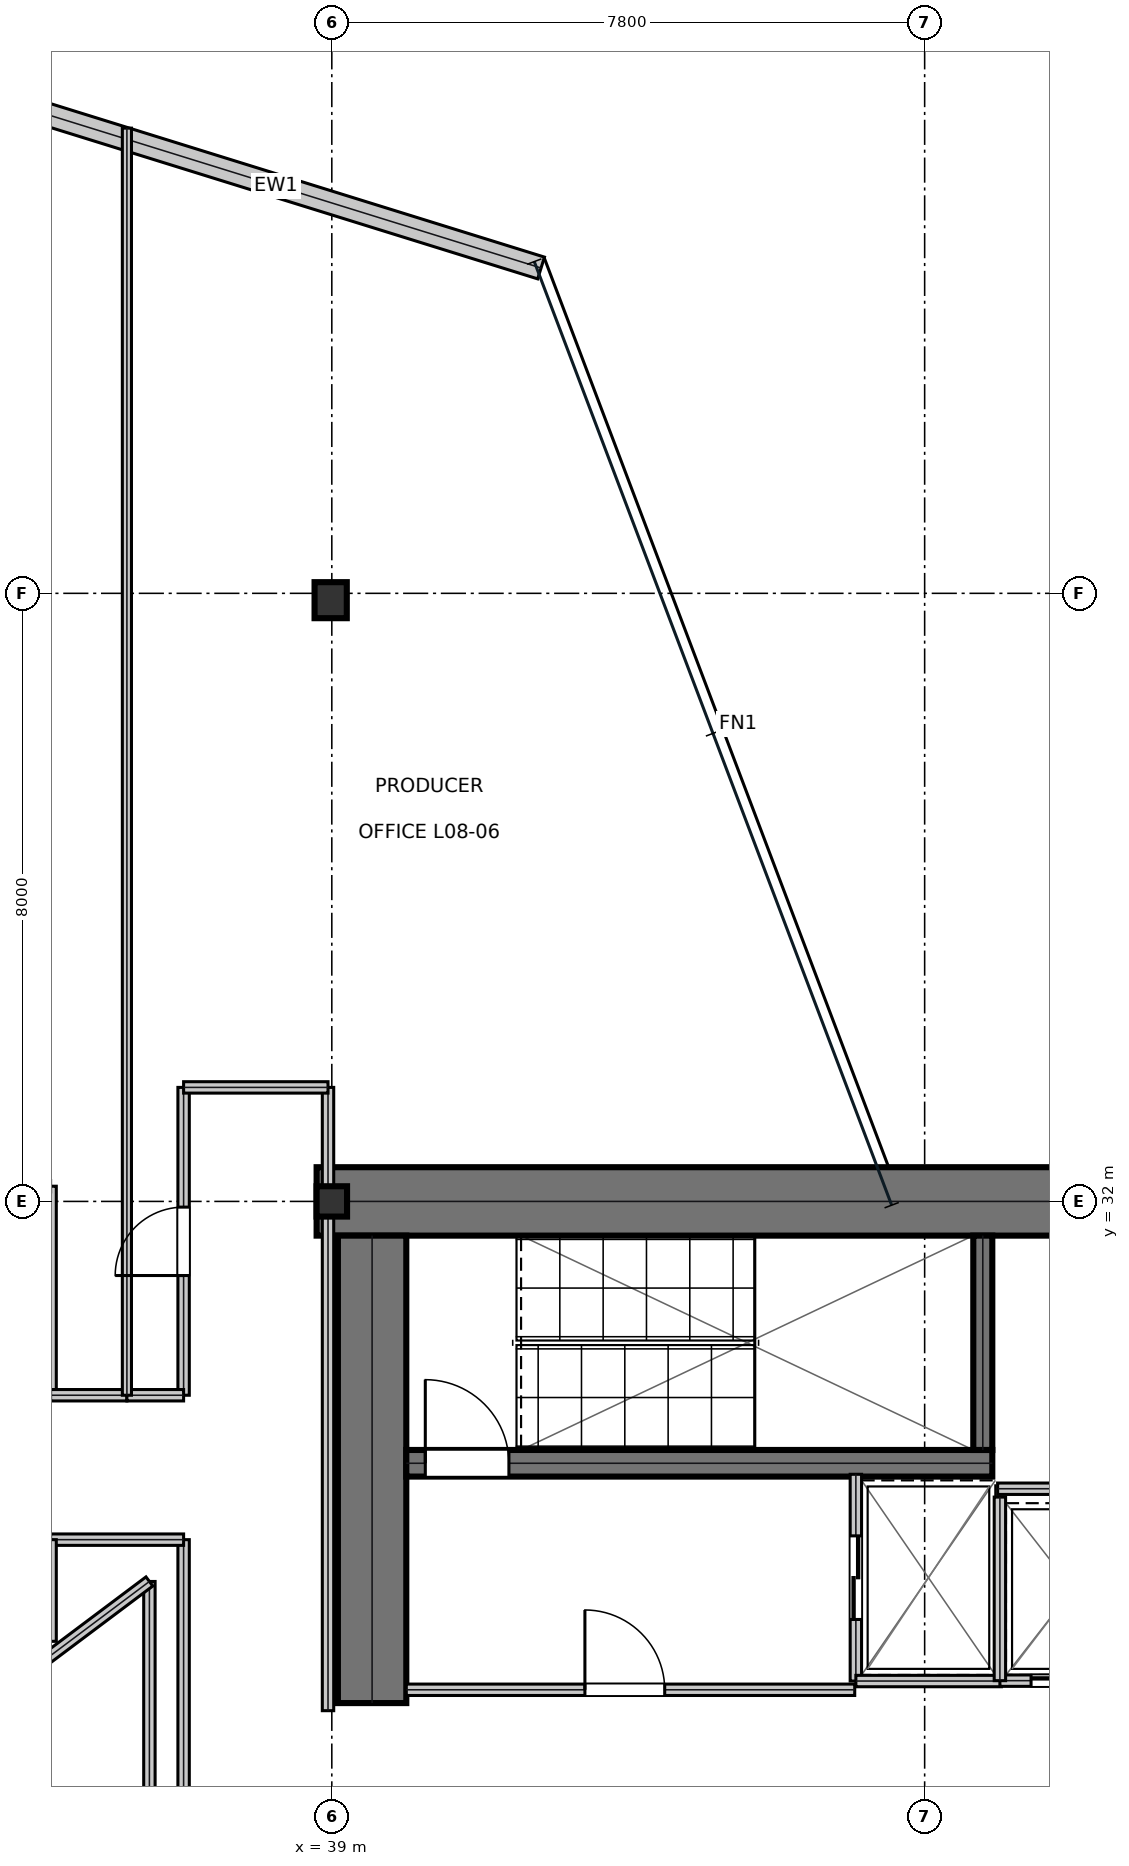
"""IFC4 building model, lengths in metres.
Left out: names, types, materials, properties, quantities, classifications, styles, units other than length and angle.
Written with IfcOpenShell. Run it as: python <this file> out.ifc"""

import sys

from ifc_helpers import new_model, si_unit, direction, frame, frame_2d, origin, origin_2d, place, context, subcontext, project, spatial, rectangle, i_section, extrude, element, fill, save


model = new_model("IFC4")
c1 = context("Model", 3, precision=1e-05, world=origin(), true_north=direction((0.0, 1.0)))
c2 = subcontext(c1, "Body", "Model", "MODEL_VIEW")
j1 = project(units=[si_unit("LENGTHUNIT", "METRE"), si_unit("PLANEANGLEUNIT", "RADIAN")], contexts=[c1])
p1 = place(None, origin())
s1 = spatial("IfcSite", under=j1, at=p1, CompositionType="ELEMENT")
p2 = place(p1, origin())
s2 = spatial("IfcBuilding", under=s1, at=p2, CompositionType="ELEMENT")
p3 = place(p2, frame((0.0, 0.0, 41.85)))
s3 = spatial("IfcBuildingStorey", under=s2, at=p3, CompositionType="ELEMENT", Elevation=41.85)
p4 = place(p3, frame((38.8, 32.0, 0.0), z_axis=(0.0, 0.0, 1.0), x_axis=(1.0, 0.0, 0.0)))
e1 = element("IfcWall", 1, at=p4, inside=s3, PredefinedType="SHEAR", context=c2, shape_type="SweptSolid", body=[
    extrude(rectangle(XDim=16.0, YDim=0.9, at=frame_2d((8.0, 0.0))), origin(), (0.0, 0.0, 1.0), 3.81),
])
p5 = place(p3, frame((39.53, 25.4, 0.0), z_axis=(0.0, 0.0, 1.0), x_axis=(0.0, 1.0, 0.0)))
e2 = element("IfcWall", 2, at=p5, inside=s3, PredefinedType="SHEAR", context=c2, shape_type="SweptSolid", body=[
    extrude(rectangle(XDim=6.15, YDim=0.9, at=frame_2d((3.075, 0.0))), origin(), (0.0, 0.0, 1.0), 3.81),
])
p6 = place(p3, frame((39.98, 28.555, 0.0), z_axis=(0.0, 0.0, 1.0), x_axis=(1.0, 0.0, 0.0)))
e3 = element("IfcWall", 3, at=p6, inside=s3, PredefinedType="SHEAR", context=c2, shape_type="SweptSolid", body=[
    extrude(rectangle(XDim=7.71, YDim=0.35, at=frame_2d((3.855, 0.0))), origin(), (0.0, 0.0, 1.0), 3.81),
])
p7 = place(p6, frame((0.25, 0.0, 0.0)))
e4 = element("IfcOpeningElement", 4, at=p7, cuts=e3, PredefinedType="OPENING", context=c2, shape_type="SweptSolid", body=[
    extrude(rectangle(XDim=1.1, YDim=2.15, at=frame_2d((0.55, 1.075))), frame((0.0, 0.185, 0.0), z_axis=(0.0, -1.0, 0.0), x_axis=(1.0, 0.0, 0.0)), (0.0, 0.0, 1.0), 0.37),
])
p8 = place(p3, frame((47.565, 28.73, 0.0), z_axis=(0.0, 0.0, 1.0), x_axis=(0.0, 1.0, 0.0)))
e5 = element("IfcWall", 5, at=p8, inside=s3, PredefinedType="SHEAR", context=c2, shape_type="SweptSolid", body=[
    extrude(rectangle(XDim=2.82, YDim=0.25, at=frame_2d((1.41, 0.0))), origin(), (0.0, 0.0, 1.0), 3.81),
])
p9 = place(p3, frame((39.0, 32.0, 0.0), z_axis=(0.0, 0.0, 1.0), x_axis=(1.0, 0.0, 0.0)))
e6 = element("IfcColumn", 6, at=p9, inside=s3, PredefinedType="COLUMN", context=c2, shape_type="SweptSolid", body=[
    extrude(i_section(OverallWidth=0.401, OverallDepth=0.399, WebThickness=0.025, FlangeThickness=0.04, at=origin_2d()), origin(), (0.0, 0.0, 1.0), 4.044),
])
p10 = place(p3, frame((38.985, 39.91, 0.016), z_axis=(0.0, 0.0, 1.0), x_axis=(1.0, 0.0, 0.0)))
e7 = element("IfcColumn", 7, at=p10, inside=s3, PredefinedType="COLUMN", context=c2, shape_type="SweptSolid", body=[
    extrude(i_section(OverallWidth=0.424, OverallDepth=0.474, WebThickness=0.048, FlangeThickness=0.077, at=origin_2d()), origin(), (0.0, 0.0, 1.0), 4.018),
])
p11 = place(p3, frame((41.753, 44.28, 0.0), z_axis=(0.0, 0.0, 1.0), x_axis=(-0.954957033511, 0.296744105498, 0.0)))
e8 = element("IfcWall", 8, at=p11, inside=s3, PredefinedType="STANDARD", context=c2, shape_type="SweptSolid", body=[
    extrude(rectangle(XDim=7.302, YDim=0.3, at=frame_2d((3.651, 0.0))), origin(), (0.0, 0.0, 1.0), 3.81),
])
p12 = place(p3, frame((39.98, 25.575, 0.0), z_axis=(0.0, 0.0, 1.0), x_axis=(1.0, 0.0, 0.0)))
e9 = element("IfcWall", 9, at=p12, inside=s3, PredefinedType="PARTITIONING", context=c2, shape_type="SweptSolid", body=[
    extrude(rectangle(XDim=5.9, YDim=0.15, at=frame_2d((2.95, 0.0))), origin(), (0.0, 0.0, 1.0), 3.81),
])
p13 = place(p12, frame((2.35, 0.0, 0.0)))
e10 = element("IfcOpeningElement", 10, at=p13, cuts=e9, PredefinedType="OPENING", context=c2, shape_type="SweptSolid", body=[
    extrude(rectangle(XDim=1.05, YDim=2.15, at=frame_2d((0.525, 1.075))), frame((0.0, 0.085, 0.0), z_axis=(0.0, -1.0, 0.0), x_axis=(1.0, 0.0, 0.0)), (0.0, 0.0, 1.0), 0.17),
])
p14 = place(p3, frame((45.895, 25.69, 0.0), z_axis=(0.0, 0.0, 1.0), x_axis=(0.0, 1.0, 0.0)))
e11 = element("IfcWall", 11, at=p14, inside=s3, PredefinedType="PARTITIONING", context=c2, shape_type="SweptSolid", body=[
    extrude(rectangle(XDim=2.72, YDim=0.15, at=frame_2d((1.36, 0.0))), origin(), (0.0, 0.0, 1.0), 3.81),
])
p15 = place(p14, frame((0.81, 0.0, 0.0)))
e12 = element("IfcOpeningElement", 12, at=p15, cuts=e11, PredefinedType="OPENING", context=c2, shape_type="SweptSolid", body=[
    extrude(rectangle(XDim=1.1, YDim=2.15, at=frame_2d((0.55, 1.075))), frame((0.0, 0.085, 0.0), z_axis=(0.0, -1.0, 0.0), x_axis=(1.0, 0.0, 0.0)), (0.0, 0.0, 1.0), 0.17),
])
p16 = place(p3, frame((45.895, 25.69, 0.0), z_axis=(0.0, 0.0, 1.0), x_axis=(1.0, 0.0, 0.0)))
e13 = element("IfcWall", 13, at=p16, inside=s3, PredefinedType="PARTITIONING", context=c2, shape_type="SweptSolid", body=[
    extrude(rectangle(XDim=1.915, YDim=0.15, at=frame_2d((0.958, 0.0))), origin(), (0.0, 0.0, 1.0), 3.81),
])
p17 = place(p3, frame((47.79, 25.695, 0.0), z_axis=(0.0, 0.0, 1.0), x_axis=(1.0, 0.0, 0.0)))
e14 = element("IfcWall", 14, at=p17, inside=s3, PredefinedType="PARTITIONING", context=c2, shape_type="SweptSolid", body=[
    extrude(rectangle(XDim=1.92, YDim=0.15, at=frame_2d((0.96, 0.0))), origin(), (0.0, 0.0, 1.0), 3.81),
])
p18 = place(p17, frame((0.41, 0.0, 0.0)))
e15 = element("IfcOpeningElement", 15, at=p18, cuts=e14, PredefinedType="OPENING", context=c2, shape_type="SweptSolid", body=[
    extrude(rectangle(XDim=1.1, YDim=2.15, at=frame_2d((0.55, 1.075))), frame((0.0, 0.085, 0.0), z_axis=(0.0, -1.0, 0.0), x_axis=(1.0, 0.0, 0.0)), (0.0, 0.0, 1.0), 0.17),
])
p19 = place(p3, frame((47.79, 25.695, 0.0), z_axis=(0.0, 0.0, 1.0), x_axis=(0.0, 1.0, 0.0)))
e16 = element("IfcWall", 16, at=p19, inside=s3, PredefinedType="PARTITIONING", context=c2, shape_type="SweptSolid", body=[
    extrude(rectangle(XDim=2.415, YDim=0.15, at=frame_2d((1.208, 0.0))), origin(), (0.0, 0.0, 1.0), 3.81),
])
p20 = place(p3, frame((47.76, 28.22, 0.0), z_axis=(0.0, 0.0, 1.0), x_axis=(1.0, 0.0, 0.0)))
e17 = element("IfcWall", 17, at=p20, inside=s3, PredefinedType="PARTITIONING", context=c2, shape_type="SweptSolid", body=[
    extrude(rectangle(XDim=1.96, YDim=0.15, at=frame_2d((0.98, 0.0))), origin(), (0.0, 0.0, 1.0), 3.81),
])
p21 = place(p3, frame((37.05, 14.5, 0.0), z_axis=(0.0, 0.0, 1.0), x_axis=(0.0, 1.0, 0.0)))
e18 = element("IfcWall", 18, at=p21, inside=s3, PredefinedType="PARTITIONING", context=c2, shape_type="SweptSolid", body=[
    extrude(rectangle(XDim=13.05, YDim=0.15, at=frame_2d((6.525, 0.0))), origin(), (0.0, 0.0, 1.0), 3.181),
])
p22 = place(p21, frame((4.635, 0.0, 0.0)))
e19 = element("IfcOpeningElement", 19, at=p22, cuts=e18, PredefinedType="OPENING", context=c2, shape_type="SweptSolid", body=[
    extrude(rectangle(XDim=0.9, YDim=2.15, at=frame_2d((0.45, 1.075))), frame((0.0, 0.085, 0.0), z_axis=(0.0, -1.0, 0.0), x_axis=(1.0, 0.0, 0.0)), (0.0, 0.0, 1.0), 0.17),
])
p23 = place(p3, frame((37.05, 29.45, 0.0), z_axis=(0.0, 0.0, 1.0), x_axis=(0.0, 1.0, 0.0)))
e20 = element("IfcWall", 20, at=p23, inside=s3, PredefinedType="PARTITIONING", context=c2, shape_type="SweptSolid", body=[
    extrude(rectangle(XDim=4.05, YDim=0.15, at=frame_2d((2.025, 0.0))), origin(), (0.0, 0.0, 1.0), 3.181),
])
p24 = place(p23, frame((1.575, 0.0, 0.0)))
e21 = element("IfcOpeningElement", 21, at=p24, cuts=e20, PredefinedType="OPENING", context=c2, shape_type="SweptSolid", body=[
    extrude(rectangle(XDim=0.9, YDim=2.15, at=frame_2d((0.45, 1.075))), frame((0.0, 0.085, 0.0), z_axis=(0.0, -1.0, 0.0), x_axis=(1.0, 0.0, 0.0)), (0.0, 0.0, 1.0), 0.17),
])
p25 = place(p3, frame((35.3, 27.55, 0.0), z_axis=(0.0, 0.0, 1.0), x_axis=(1.0, 0.0, 0.0)))
e22 = element("IfcWall", 22, at=p25, inside=s3, PredefinedType="PARTITIONING", context=c2, shape_type="SweptSolid", body=[
    extrude(rectangle(XDim=1.75, YDim=0.15, at=frame_2d((0.875, 0.0))), origin(), (0.0, 0.0, 1.0), 3.391),
])
p26 = place(p3, frame((35.3, 26.212, 0.0), z_axis=(0.0, 0.0, 1.0), x_axis=(0.0, 1.0, 0.0)))
e23 = element("IfcWall", 23, at=p26, inside=s3, PredefinedType="PARTITIONING", context=c2, shape_type="SweptSolid", body=[
    extrude(rectangle(XDim=1.338, YDim=0.15, at=frame_2d((0.669, 0.0))), origin(), (0.0, 0.0, 1.0), 3.81),
])
p27 = place(p3, frame((35.3, 29.45, 0.0), z_axis=(0.0, 0.0, 1.0), x_axis=(0.0, 1.0, 0.0)))
e24 = element("IfcWall", 24, at=p27, inside=s3, PredefinedType="PARTITIONING", context=c2, shape_type="SweptSolid", body=[
    extrude(rectangle(XDim=2.75, YDim=0.15, at=frame_2d((1.375, 0.0))), origin(), (0.0, 0.0, 1.0), 3.181),
])
p28 = place(p3, frame((35.3, 29.45, 0.0), z_axis=(0.0, 0.0, 1.0), x_axis=(1.0, 0.0, 0.0)))
e25 = element("IfcWall", 25, at=p28, inside=s3, PredefinedType="PARTITIONING", context=c2, shape_type="SweptSolid", body=[
    extrude(rectangle(XDim=1.004, YDim=0.15, at=frame_2d((0.502, 0.0))), origin(), (0.0, 0.0, 1.0), 3.81),
])
p29 = place(p3, frame((38.95, 25.3, 0.0), z_axis=(0.0, 0.0, 1.0), x_axis=(0.0, 1.0, 0.0)))
e26 = element("IfcWall", 26, at=p29, inside=s3, PredefinedType="PARTITIONING", context=c2, shape_type="SweptSolid", body=[
    extrude(rectangle(XDim=8.2, YDim=0.15, at=frame_2d((4.1, 0.0))), origin(), (0.0, 0.0, 1.0), 3.181),
])
p30 = place(p3, frame((37.05, 33.5, 0.0), z_axis=(0.0, 0.0, 1.0), x_axis=(1.0, 0.0, 0.0)))
e27 = element("IfcWall", 27, at=p30, inside=s3, PredefinedType="PARTITIONING", context=c2, shape_type="SweptSolid", body=[
    extrude(rectangle(XDim=1.9, YDim=0.15, at=frame_2d((0.95, 0.0))), origin(), (0.0, 0.0, 1.0), 3.81),
])
p31 = place(p3, frame((36.304, 29.45, 0.0), z_axis=(0.0, 0.0, 1.0), x_axis=(1.0, 0.0, 0.0)))
e28 = element("IfcWall", 28, at=p31, inside=s3, PredefinedType="PARTITIONING", context=c2, shape_type="SweptSolid", body=[
    extrude(rectangle(XDim=0.746, YDim=0.15, at=frame_2d((0.373, 0.0))), origin(), (0.0, 0.0, 1.0), 3.81),
])
p32 = place(p3, frame((36.304, 29.45, 0.0), z_axis=(0.0, 0.0, 1.0), x_axis=(0.0, 1.0, 0.0)))
e29 = element("IfcWall", 29, at=p32, inside=s3, PredefinedType="PARTITIONING", context=c2, shape_type="SweptSolid", body=[
    extrude(rectangle(XDim=16.67, YDim=0.12, at=frame_2d((8.335, 0.0))), origin(), (0.0, 0.0, 1.0), 3.181),
])
p33 = place(p3, frame((36.6, 21.0, 0.0), z_axis=(0.0, 0.0, 1.0), x_axis=(0.0, 1.0, 0.0)))
e30 = element("IfcWall", 30, at=p33, inside=s3, PredefinedType="MOVABLE", context=c2, shape_type="SweptSolid", body=[
    extrude(rectangle(XDim=6.0, YDim=0.15, at=frame_2d((3.0, 0.0))), origin(), (0.0, 0.0, 1.0), 3.81),
])
p34 = place(p3, frame((36.6, 27.0, 0.0), z_axis=(0.0, 0.0, 1.0), x_axis=(-0.8, -0.6, 0.0)))
e31 = element("IfcWall", 31, at=p34, inside=s3, PredefinedType="MOVABLE", context=c2, shape_type="SweptSolid", body=[
    extrude(rectangle(XDim=5.0, YDim=0.15, at=frame_2d((2.5, 0.0))), origin(), (0.0, 0.0, 1.0), 3.81),
])
p35 = place(p13, origin())
e32 = element("IfcDoor", 32, at=p35, inside=s3, OperationType="SINGLE_SWING_LEFT", PredefinedType="DOOR", context=c2, shape_type="SweptSolid", body=[
    extrude(rectangle(XDim=1.05, YDim=2.15, at=frame_2d((0.525, 1.075))), frame((0.0, 0.025, 0.0), z_axis=(0.0, -1.0, 0.0), x_axis=(1.0, 0.0, 0.0)), (0.0, 0.0, 1.0), 0.05),
])
fill(e10, e32)
p36 = place(p15, frame((1.1, 0.0, 0.0), z_axis=(0.0, 0.0, 1.0), x_axis=(-1.0, 0.0, 0.0)))
e33 = element("IfcDoor", 33, at=p36, inside=s3, OperationType="DOUBLE_DOOR_SLIDING", PredefinedType="DOOR", context=c2, shape_type="SweptSolid", body=[
    extrude(rectangle(XDim=1.1, YDim=2.15, at=frame_2d((0.55, 1.075))), frame((0.0, 0.025, 0.0), z_axis=(0.0, -1.0, 0.0), x_axis=(1.0, 0.0, 0.0)), (0.0, 0.0, 1.0), 0.05),
])
fill(e12, e33)
p37 = place(p18, frame((1.1, 0.0, 0.0), z_axis=(0.0, 0.0, 1.0), x_axis=(-1.0, 0.0, 0.0)))
e34 = element("IfcDoor", 34, at=p37, inside=s3, OperationType="DOUBLE_DOOR_SLIDING", PredefinedType="DOOR", context=c2, shape_type="SweptSolid", body=[
    extrude(rectangle(XDim=1.1, YDim=2.15, at=frame_2d((0.55, 1.075))), frame((0.0, 0.025, 0.0), z_axis=(0.0, -1.0, 0.0), x_axis=(1.0, 0.0, 0.0)), (0.0, 0.0, 1.0), 0.05),
])
fill(e15, e34)
p38 = place(p24, origin())
e35 = element("IfcDoor", 35, at=p38, inside=s3, OperationType="SINGLE_SWING_LEFT", PredefinedType="DOOR", context=c2, shape_type="SweptSolid", body=[
    extrude(rectangle(XDim=0.9, YDim=2.15, at=frame_2d((0.45, 1.075))), frame((0.0, 0.025, 0.0), z_axis=(0.0, -1.0, 0.0), x_axis=(1.0, 0.0, 0.0)), (0.0, 0.0, 1.0), 0.05),
])
fill(e21, e35)
p39 = place(p7, origin())
e36 = element("IfcDoor", 36, at=p39, inside=s3, OperationType="SINGLE_SWING_LEFT", PredefinedType="DOOR", context=c2, shape_type="SweptSolid", body=[
    extrude(rectangle(XDim=1.1, YDim=2.15, at=frame_2d((0.55, 1.075))), frame((0.0, 0.025, 0.0), z_axis=(0.0, -1.0, 0.0), x_axis=(1.0, 0.0, 0.0)), (0.0, 0.0, 1.0), 0.05),
])
fill(e4, e36)
save(model, sys.argv[1])
